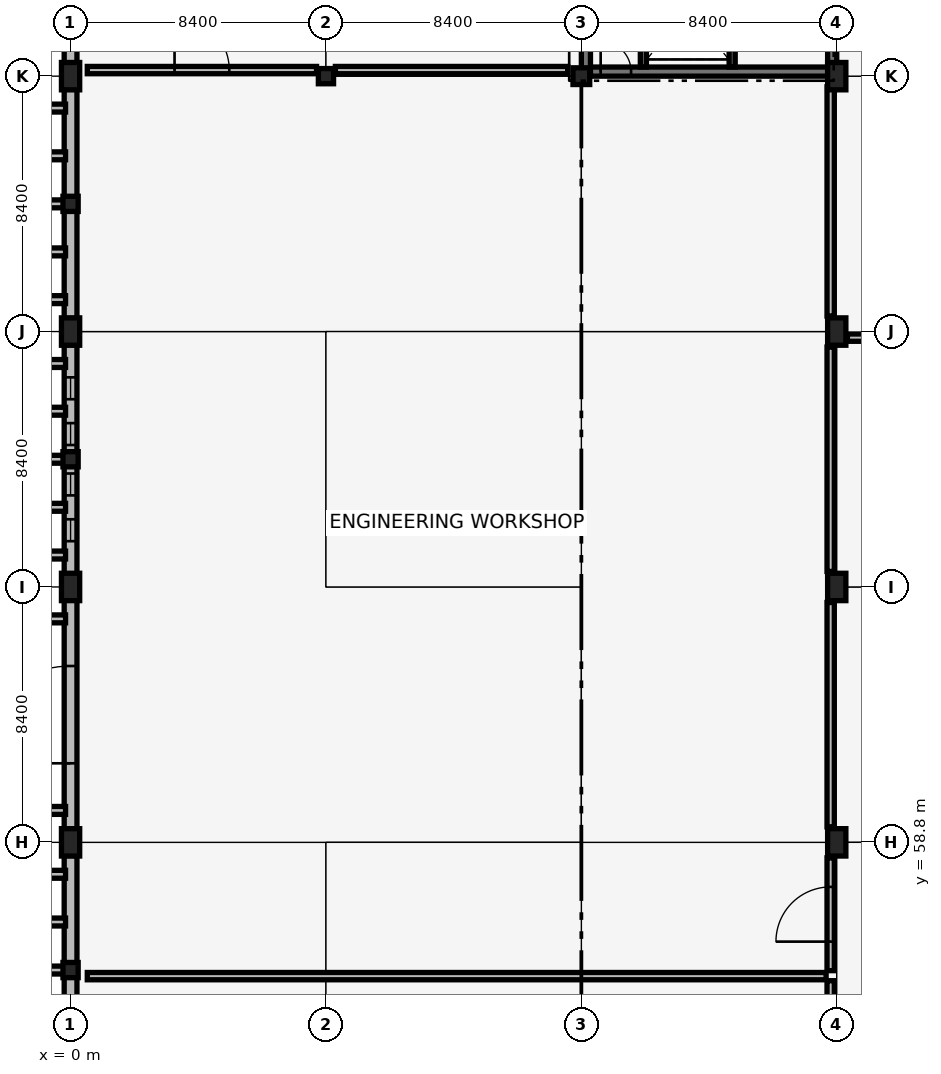
"""IFC4 building model, lengths in metres.
Left out: names, types, materials, properties, quantities, classifications, styles, units other than length and angle.
Written with IfcOpenShell. Run it as: python <this file> out.ifc"""

import sys

from ifc_helpers import new_model, si_unit, direction, frame, frame_2d, origin, origin_2d, place, context, subcontext, project, spatial, rectangle, extrude, element, fill, save


model = new_model("IFC4")
c1 = context("Model", 3, precision=1e-05, world=origin(), true_north=direction((0.0, 1.0)))
c2 = subcontext(c1, "Body", "Model", "MODEL_VIEW")
j1 = project(units=[si_unit("LENGTHUNIT", "METRE"), si_unit("PLANEANGLEUNIT", "RADIAN")], contexts=[c1])
p1 = place(None, origin())
s1 = spatial("IfcSite", under=j1, at=p1, CompositionType="ELEMENT")
p2 = place(p1, origin())
s2 = spatial("IfcBuilding", under=s1, at=p2, CompositionType="ELEMENT")
p3 = place(p2, origin())
s3 = spatial("IfcBuildingStorey", under=s2, at=p3, CompositionType="ELEMENT", Elevation=0.0)
p4 = place(p3, frame((16.95, 84.15, 0.0), z_axis=(0.0, 0.0, 1.0), x_axis=(1.0, 0.0, 0.0)))
e1 = element("IfcWall", 1, at=p4, inside=s3, PredefinedType="SHEAR", context=c2, shape_type="SweptSolid", body=[
    extrude(rectangle(XDim=8.1, YDim=0.3, at=frame_2d((4.05, 0.0))), origin(), (0.0, 0.0, 1.0), 5.14),
])
p5 = place(p4, frame((0.485, 0.0, 0.0)))
e2 = element("IfcOpeningElement", 2, at=p5, cuts=e1, PredefinedType="OPENING", context=c2, shape_type="SweptSolid", body=[
    extrude(rectangle(XDim=1.0, YDim=2.15, at=frame_2d((0.5, 1.075))), frame((0.0, 0.16, 0.0), z_axis=(0.0, -1.0, 0.0), x_axis=(1.0, 0.0, 0.0)), (0.0, 0.0, 1.0), 0.32),
])
p6 = place(p3, frame((16.95, 84.15, 0.0), z_axis=(0.0, 0.0, 1.0), x_axis=(0.0, 1.0, 0.0)))
e3 = element("IfcWall", 3, at=p6, inside=s3, PredefinedType="SHEAR", context=c2, shape_type="SweptSolid", body=[
    extrude(rectangle(XDim=8.1, YDim=0.3, at=frame_2d((4.05, 0.0))), origin(), (0.0, 0.0, 1.0), 5.14),
])
p7 = place(p3, frame((25.05, 84.15, 0.0), z_axis=(0.0, 0.0, 1.0), x_axis=(0.0, 1.0, 0.0)))
e4 = element("IfcWall", 4, at=p7, inside=s3, PredefinedType="SHEAR", context=c2, shape_type="SweptSolid", body=[
    extrude(rectangle(XDim=8.1, YDim=0.3, at=frame_2d((4.05, 0.0))), origin(), (0.0, 0.0, 1.0), 5.14),
])
p8 = place(p7, frame((1.325, 0.0, 0.0)))
e5 = element("IfcOpeningElement", 5, at=p8, cuts=e4, PredefinedType="OPENING", context=c2, shape_type="SweptSolid", body=[
    extrude(rectangle(XDim=1.45, YDim=2.15, at=frame_2d((0.725, 1.075))), frame((0.0, 0.16, 0.0), z_axis=(0.0, -1.0, 0.0), x_axis=(1.0, 0.0, 0.0)), (0.0, 0.0, 1.0), 0.32),
])
p9 = place(p3, frame((0.0, 54.6, 0.0), z_axis=(0.0, 0.0, 1.0), x_axis=(1.0, 0.0, 0.0)))
e6 = element("IfcColumn", 6, at=p9, inside=s3, PredefinedType="PILASTER", context=c2, shape_type="SweptSolid", body=[
    extrude(rectangle(XDim=0.5, YDim=0.5, at=origin_2d()), origin(), (0.0, 0.0, 1.0), 5.14),
])
for number, where, z_axis, x_axis in (
    (7, (0.0, 58.8, 0.0), (0.0, 0.0, 1.0), (1.0, 0.0, 0.0)),
    (8, (0.0, 67.2, 0.0), (0.0, 0.0, 1.0), (1.0, 0.0, 0.0)),
):
    element("IfcColumn", number, at=place(p3, frame(where, z_axis=z_axis, x_axis=x_axis)), inside=s3, PredefinedType="COLUMN", context=c2, shape_type="SweptSolid", body=[
        extrude(rectangle(XDim=0.6, YDim=0.9, at=origin_2d()), origin(), (0.0, 0.0, 1.0), 5.14),
    ])
p10 = place(p3, frame((0.0, 71.4, 0.0), z_axis=(0.0, 0.0, 1.0), x_axis=(1.0, 0.0, 0.0)))
e9 = element("IfcColumn", 9, at=p10, inside=s3, PredefinedType="PILASTER", context=c2, shape_type="SweptSolid", body=[
    extrude(rectangle(XDim=0.5, YDim=0.5, at=origin_2d()), origin(), (0.0, 0.0, 1.0), 5.14),
])
p11 = place(p3, frame((0.0, 75.6, 0.0), z_axis=(0.0, 0.0, 1.0), x_axis=(1.0, 0.0, 0.0)))
e10 = element("IfcColumn", 10, at=p11, inside=s3, PredefinedType="COLUMN", context=c2, shape_type="SweptSolid", body=[
    extrude(rectangle(XDim=0.6, YDim=0.9, at=origin_2d()), origin(), (0.0, 0.0, 1.0), 5.14),
])
p12 = place(p3, frame((0.0, 79.8, 0.0), z_axis=(0.0, 0.0, 1.0), x_axis=(1.0, 0.0, 0.0)))
e11 = element("IfcColumn", 11, at=p12, inside=s3, PredefinedType="PILASTER", context=c2, shape_type="SweptSolid", body=[
    extrude(rectangle(XDim=0.5, YDim=0.5, at=origin_2d()), origin(), (0.0, 0.0, 1.0), 5.14),
])
p13 = place(p3, frame((0.0, 84.0, 0.0), z_axis=(0.0, 0.0, 1.0), x_axis=(1.0, 0.0, 0.0)))
e12 = element("IfcColumn", 12, at=p13, inside=s3, PredefinedType="COLUMN", context=c2, shape_type="SweptSolid", body=[
    extrude(rectangle(XDim=0.6, YDim=0.9, at=origin_2d()), origin(), (0.0, 0.0, 1.0), 5.14),
])
p14 = place(p3, frame((8.4, 84.0, 0.0), z_axis=(0.0, 0.0, 1.0), x_axis=(1.0, 0.0, 0.0)))
e13 = element("IfcColumn", 13, at=p14, inside=s3, PredefinedType="COLUMN", context=c2, shape_type="SweptSolid", body=[
    extrude(rectangle(XDim=0.5, YDim=0.5, at=origin_2d()), origin(), (0.0, 0.0, 1.0), 5.14),
])
p15 = place(p3, frame((16.8, 84.0, 0.0), z_axis=(0.0, 0.0, 1.0), x_axis=(1.0, 0.0, 0.0)))
e14 = element("IfcColumn", 14, at=p15, inside=s3, PredefinedType="COLUMN", context=c2, shape_type="SweptSolid", body=[
    extrude(rectangle(XDim=0.55, YDim=0.55, at=origin_2d()), origin(), (0.0, 0.0, 1.0), 5.14),
])
for number, where, z_axis, x_axis in (
    (15, (25.2, 58.8, 0.0), (0.0, 0.0, 1.0), (1.0, 0.0, 0.0)),
    (16, (25.2, 67.2, 0.0), (0.0, 0.0, 1.0), (1.0, 0.0, 0.0)),
    (17, (25.2, 75.6, 0.0), (0.0, 0.0, 1.0), (1.0, 0.0, 0.0)),
    (18, (25.2, 84.0, 0.0), (0.0, 0.0, 1.0), (1.0, 0.0, 0.0)),
):
    element("IfcColumn", number, at=place(p3, frame(where, z_axis=z_axis, x_axis=x_axis)), inside=s3, PredefinedType="COLUMN", context=c2, shape_type="SweptSolid", body=[
        extrude(rectangle(XDim=0.6, YDim=0.9, at=origin_2d()), origin(), (0.0, 0.0, 1.0), 5.14),
    ])
p16 = place(p3, frame((0.0, 50.835, 0.0), z_axis=(0.0, 0.0, 1.0), x_axis=(0.0, 1.0, 0.0)))
e19 = element("IfcWall", 19, at=p16, inside=s3, PredefinedType="SOLIDWALL", context=c2, shape_type="SweptSolid", body=[
    extrude(rectangle(XDim=7.53, YDim=0.42, at=frame_2d((3.765, 0.0))), origin(), (0.0, 0.0, 1.0), 5.04),
])
for number, where, z_axis, x_axis in (
    (20, (-0.165, 54.6, -0.25), (0.0, 0.0, 1.0), (-1.0, 0.0, 0.0)),
    (21, (-0.165, 56.18, -0.25), (0.0, 0.0, 1.0), (-1.0, 0.0, 0.0)),
    (22, (-0.165, 57.75, -0.25), (0.0, 0.0, 1.0), (-1.0, 0.0, 0.0)),
):
    element("IfcWall", number, at=place(p3, frame(where, z_axis=z_axis, x_axis=x_axis)), inside=s3, PredefinedType="SOLIDWALL", context=c2, shape_type="SweptSolid", body=[
        extrude(rectangle(XDim=0.7, YDim=0.26, at=frame_2d((0.35, 0.0))), origin(), (0.0, 0.0, 1.0), 5.69),
    ])
p17 = place(p3, frame((0.0, 59.235, 0.0), z_axis=(0.0, 0.0, 1.0), x_axis=(0.0, 1.0, 0.0)))
e23 = element("IfcWall", 23, at=p17, inside=s3, PredefinedType="SOLIDWALL", context=c2, shape_type="SweptSolid", body=[
    extrude(rectangle(XDim=7.53, YDim=0.42, at=frame_2d((3.765, 0.0))), origin(), (0.0, 0.0, 1.0), 5.04),
])
p18 = place(p17, frame((2.165, 0.0, 0.0)))
e24 = element("IfcOpeningElement", 24, at=p18, cuts=e23, PredefinedType="OPENING", context=c2, shape_type="SweptSolid", body=[
    extrude(rectangle(XDim=3.2, YDim=3.6, at=frame_2d((1.6, 1.8))), frame((0.0, 0.22, 0.0), z_axis=(0.0, -1.0, 0.0), x_axis=(1.0, 0.0, 0.0)), (0.0, 0.0, 1.0), 0.44),
])
for number, where, z_axis, x_axis in (
    (25, (-0.165, 59.85, -0.25), (0.0, 0.0, 1.0), (-1.0, 0.0, 0.0)),
    (26, (-0.165, 66.15, -0.25), (0.0, 0.0, 1.0), (-1.0, 0.0, 0.0)),
):
    element("IfcWall", number, at=place(p3, frame(where, z_axis=z_axis, x_axis=x_axis)), inside=s3, PredefinedType="SOLIDWALL", context=c2, shape_type="SweptSolid", body=[
        extrude(rectangle(XDim=0.7, YDim=0.26, at=frame_2d((0.35, 0.0))), origin(), (0.0, 0.0, 1.0), 5.69),
    ])
p19 = place(p3, frame((0.0, 67.635, 0.0), z_axis=(0.0, 0.0, 1.0), x_axis=(0.0, 1.0, 0.0)))
e27 = element("IfcWall", 27, at=p19, inside=s3, PredefinedType="SOLIDWALL", context=c2, shape_type="SweptSolid", body=[
    extrude(rectangle(XDim=7.53, YDim=0.42, at=frame_2d((3.765, 0.0))), origin(), (0.0, 0.0, 1.0), 5.04),
])
p20 = place(p19, frame((1.071, 0.0, 0.75)))
e28 = element("IfcOpeningElement", 28, at=p20, cuts=e27, PredefinedType="OPENING", context=c2, shape_type="SweptSolid", body=[
    extrude(rectangle(XDim=0.72, YDim=2.4, at=frame_2d((0.36, 1.2))), frame((0.0, 0.22, 0.0), z_axis=(0.0, -1.0, 0.0), x_axis=(1.0, 0.0, 0.0)), (0.0, 0.0, 1.0), 0.44),
])
p21 = place(p19, frame((2.577, 0.0, 0.75)))
e29 = element("IfcOpeningElement", 29, at=p21, cuts=e27, PredefinedType="OPENING", context=c2, shape_type="SweptSolid", body=[
    extrude(rectangle(XDim=0.72, YDim=2.4, at=frame_2d((0.36, 1.2))), frame((0.0, 0.22, 0.0), z_axis=(0.0, -1.0, 0.0), x_axis=(1.0, 0.0, 0.0)), (0.0, 0.0, 1.0), 0.44),
])
p22 = place(p19, frame((4.233, 0.0, 0.75)))
e30 = element("IfcOpeningElement", 30, at=p22, cuts=e27, PredefinedType="OPENING", context=c2, shape_type="SweptSolid", body=[
    extrude(rectangle(XDim=0.72, YDim=2.4, at=frame_2d((0.36, 1.2))), frame((0.0, 0.22, 0.0), z_axis=(0.0, -1.0, 0.0), x_axis=(1.0, 0.0, 0.0)), (0.0, 0.0, 1.0), 0.44),
])
p23 = place(p19, frame((5.739, 0.0, 0.75)))
e31 = element("IfcOpeningElement", 31, at=p23, cuts=e27, PredefinedType="OPENING", context=c2, shape_type="SweptSolid", body=[
    extrude(rectangle(XDim=0.72, YDim=2.4, at=frame_2d((0.36, 1.2))), frame((0.0, 0.22, 0.0), z_axis=(0.0, -1.0, 0.0), x_axis=(1.0, 0.0, 0.0)), (0.0, 0.0, 1.0), 0.44),
])
for number, where, z_axis, x_axis in (
    (32, (-0.165, 68.25, -0.25), (0.0, 0.0, 1.0), (-1.0, 0.0, 0.0)),
    (33, (-0.165, 69.82, -0.25), (0.0, 0.0, 1.0), (-1.0, 0.0, 0.0)),
    (34, (-0.165, 71.4, -0.25), (0.0, 0.0, 1.0), (-1.0, 0.0, 0.0)),
    (35, (-0.165, 72.98, -0.25), (0.0, 0.0, 1.0), (-1.0, 0.0, 0.0)),
    (36, (-0.165, 74.55, -0.25), (0.0, 0.0, 1.0), (-1.0, 0.0, 0.0)),
):
    element("IfcWall", number, at=place(p3, frame(where, z_axis=z_axis, x_axis=x_axis)), inside=s3, PredefinedType="SOLIDWALL", context=c2, shape_type="SweptSolid", body=[
        extrude(rectangle(XDim=0.7, YDim=0.26, at=frame_2d((0.35, 0.0))), origin(), (0.0, 0.0, 1.0), 5.69),
    ])
p24 = place(p3, frame((0.0, 76.035, 0.0), z_axis=(0.0, 0.0, 1.0), x_axis=(0.0, 1.0, 0.0)))
e37 = element("IfcWall", 37, at=p24, inside=s3, PredefinedType="SOLIDWALL", context=c2, shape_type="SweptSolid", body=[
    extrude(rectangle(XDim=7.53, YDim=0.42, at=frame_2d((3.765, 0.0))), origin(), (0.0, 0.0, 1.0), 5.04),
])
for number, where, z_axis, x_axis in (
    (38, (-0.165, 76.65, -0.25), (0.0, 0.0, 1.0), (-1.0, 0.0, 0.0)),
    (39, (-0.165, 78.22, -0.25), (0.0, 0.0, 1.0), (-1.0, 0.0, 0.0)),
    (40, (-0.165, 79.8, -0.25), (0.0, 0.0, 1.0), (-1.0, 0.0, 0.0)),
    (41, (-0.165, 81.38, -0.25), (0.0, 0.0, 1.0), (-1.0, 0.0, 0.0)),
    (42, (-0.165, 82.95, -0.25), (0.0, 0.0, 1.0), (-1.0, 0.0, 0.0)),
):
    element("IfcWall", number, at=place(p3, frame(where, z_axis=z_axis, x_axis=x_axis)), inside=s3, PredefinedType="SOLIDWALL", context=c2, shape_type="SweptSolid", body=[
        extrude(rectangle(XDim=0.7, YDim=0.26, at=frame_2d((0.35, 0.0))), origin(), (0.0, 0.0, 1.0), 5.69),
    ])
p25 = place(p3, frame((0.0, 84.435, 0.0), z_axis=(0.0, 0.0, 1.0), x_axis=(0.0, 1.0, 0.0)))
e43 = element("IfcWall", 43, at=p25, inside=s3, PredefinedType="SOLIDWALL", context=c2, shape_type="SweptSolid", body=[
    extrude(rectangle(XDim=7.72, YDim=0.42, at=frame_2d((3.86, 0.0))), origin(), (0.0, 0.0, 1.0), 4.35),
])
p26 = place(p25, frame((2.16, 0.0, 0.0)))
e44 = element("IfcOpeningElement", 44, at=p26, cuts=e43, PredefinedType="OPENING", context=c2, shape_type="SweptSolid", body=[
    extrude(rectangle(XDim=3.4, YDim=3.8, at=frame_2d((1.7, 1.9))), frame((0.0, 0.22, 0.0), z_axis=(0.0, -1.0, 0.0), x_axis=(1.0, 0.0, 0.0)), (0.0, 0.0, 1.0), 0.44),
])
p27 = place(p3, frame((21.76, 84.3, 0.0), z_axis=(0.0, 0.0, 1.0), x_axis=(0.0, 1.0, 0.0)))
e45 = element("IfcWall", 45, at=p27, inside=s3, PredefinedType="SHEAR", context=c2, shape_type="SweptSolid", body=[
    extrude(rectangle(XDim=3.8, YDim=0.2, at=frame_2d((1.9, 0.0))), origin(), (0.0, 0.0, 1.0), 4.36),
])
p28 = place(p27, frame((1.2, 0.0, 0.0)))
e46 = element("IfcOpeningElement", 46, at=p28, cuts=e45, PredefinedType="OPENING", context=c2, shape_type="SweptSolid", body=[
    extrude(rectangle(XDim=1.4, YDim=2.2, at=frame_2d((0.7, 1.1))), frame((0.0, 0.11, 0.0), z_axis=(0.0, -1.0, 0.0), x_axis=(1.0, 0.0, 0.0)), (0.0, 0.0, 1.0), 0.22),
])
p29 = place(p3, frame((18.84, 84.3, 0.0), z_axis=(0.0, 0.0, 1.0), x_axis=(0.0, 1.0, 0.0)))
e47 = element("IfcWall", 47, at=p29, inside=s3, PredefinedType="SHEAR", context=c2, shape_type="SweptSolid", body=[
    extrude(rectangle(XDim=3.8, YDim=0.2, at=frame_2d((1.9, 0.0))), origin(), (0.0, 0.0, 1.0), 4.36),
])
p30 = place(p3, frame((0.55, 54.4, 0.0), z_axis=(0.0, 0.0, 1.0), x_axis=(1.0, 0.0, 0.0)))
e48 = element("IfcWall", 48, at=p30, inside=s3, PredefinedType="PARTITIONING", context=c2, shape_type="SweptSolid", body=[
    extrude(rectangle(XDim=24.3, YDim=0.24, at=frame_2d((12.15, 0.0))), origin(), (0.0, 0.0, 1.0), 5.14),
])
p31 = place(p3, frame((25.0, 50.91, 0.0), z_axis=(0.0, 0.0, 1.0), x_axis=(0.0, 1.0, 0.0)))
e49 = element("IfcWall", 49, at=p31, inside=s3, PredefinedType="PARTITIONING", context=c2, shape_type="SweptSolid", body=[
    extrude(rectangle(XDim=3.34, YDim=0.24, at=frame_2d((1.67, 0.0))), origin(), (0.0, 0.0, 1.0), 4.35),
])
p32 = place(p3, frame((25.0, 54.58, 0.0), z_axis=(0.0, 0.0, 1.0), x_axis=(0.0, 1.0, 0.0)))
e50 = element("IfcWall", 50, at=p32, inside=s3, PredefinedType="PARTITIONING", context=c2, shape_type="SweptSolid", body=[
    extrude(rectangle(XDim=3.71, YDim=0.24, at=frame_2d((1.855, 0.0))), origin(), (0.0, 0.0, 1.0), 4.35),
])
p33 = place(p32, frame((0.955, 0.0, 0.0)))
e51 = element("IfcOpeningElement", 51, at=p33, cuts=e50, PredefinedType="OPENING", context=c2, shape_type="SweptSolid", body=[
    extrude(rectangle(XDim=1.8, YDim=2.4, at=frame_2d((0.9, 1.2))), frame((0.0, 0.13, 0.0), z_axis=(0.0, -1.0, 0.0), x_axis=(1.0, 0.0, 0.0)), (0.0, 0.0, 1.0), 0.26),
])
p34 = place(p3, frame((25.0, 59.31, 0.0), z_axis=(0.0, 0.0, 1.0), x_axis=(0.0, 1.0, 0.0)))
e52 = element("IfcWall", 52, at=p34, inside=s3, PredefinedType="PARTITIONING", context=c2, shape_type="SweptSolid", body=[
    extrude(rectangle(XDim=7.38, YDim=0.24, at=frame_2d((3.69, 0.0))), origin(), (0.0, 0.0, 1.0), 4.35),
])
p35 = place(p3, frame((25.0, 67.71, 0.0), z_axis=(0.0, 0.0, 1.0), x_axis=(0.0, 1.0, 0.0)))
e53 = element("IfcWall", 53, at=p35, inside=s3, PredefinedType="PARTITIONING", context=c2, shape_type="SweptSolid", body=[
    extrude(rectangle(XDim=7.38, YDim=0.24, at=frame_2d((3.69, 0.0))), origin(), (0.0, 0.0, 1.0), 4.35),
])
p36 = place(p3, frame((25.0, 76.11, 0.0), z_axis=(0.0, 0.0, 1.0), x_axis=(0.0, 1.0, 0.0)))
e54 = element("IfcWall", 54, at=p36, inside=s3, PredefinedType="PARTITIONING", context=c2, shape_type="SweptSolid", body=[
    extrude(rectangle(XDim=7.54, YDim=0.24, at=frame_2d((3.77, 0.0))), origin(), (0.0, 0.0, 1.0), 4.35),
])
p37 = place(p3, frame((25.55, 75.4, 0.0), z_axis=(0.0, 0.0, 1.0), x_axis=(1.0, 0.0, 0.0)))
e55 = element("IfcWall", 55, at=p37, inside=s3, PredefinedType="PARTITIONING", context=c2, shape_type="SweptSolid", body=[
    extrude(rectangle(XDim=7.5, YDim=0.24, at=frame_2d((3.75, 0.0))), origin(), (0.0, 0.0, 1.0), 4.42),
])
p38 = place(p37, frame((2.85, 0.0, 0.0)))
e56 = element("IfcOpeningElement", 56, at=p38, cuts=e55, PredefinedType="OPENING", context=c2, shape_type="SweptSolid", body=[
    extrude(rectangle(XDim=1.8, YDim=2.4, at=frame_2d((0.9, 1.2))), frame((0.0, 0.13, 0.0), z_axis=(0.0, -1.0, 0.0), x_axis=(1.0, 0.0, 0.0)), (0.0, 0.0, 1.0), 0.26),
])
p39 = place(p3, frame((0.55, 84.2, 0.0), z_axis=(0.0, 0.0, 1.0), x_axis=(1.0, 0.0, 0.0)))
e57 = element("IfcWall", 57, at=p39, inside=s3, PredefinedType="PARTITIONING", context=c2, shape_type="SweptSolid", body=[
    extrude(rectangle(XDim=7.54, YDim=0.24, at=frame_2d((3.77, 0.0))), origin(), (0.0, 0.0, 1.0), 4.36),
])
p40 = place(p39, frame((2.87, 0.0, 0.0)))
e58 = element("IfcOpeningElement", 58, at=p40, cuts=e57, PredefinedType="OPENING", context=c2, shape_type="SweptSolid", body=[
    extrude(rectangle(XDim=1.8, YDim=2.4, at=frame_2d((0.9, 1.2))), frame((0.0, 0.13, 0.0), z_axis=(0.0, -1.0, 0.0), x_axis=(1.0, 0.0, 0.0)), (0.0, 0.0, 1.0), 0.26),
])
p41 = place(p3, frame((8.71, 84.2, 0.0), z_axis=(0.0, 0.0, 1.0), x_axis=(1.0, 0.0, 0.0)))
e59 = element("IfcWall", 59, at=p41, inside=s3, PredefinedType="PARTITIONING", context=c2, shape_type="SweptSolid", body=[
    extrude(rectangle(XDim=7.64, YDim=0.24, at=frame_2d((3.82, 0.0))), origin(), (0.0, 0.0, 1.0), 4.36),
])
p42 = place(p18, origin())
e60 = element("IfcDoor", 60, at=p42, inside=s3, OperationType="DOUBLE_DOOR_SINGLE_SWING", PredefinedType="GATE", context=c2, shape_type="SweptSolid", body=[
    extrude(rectangle(XDim=3.2, YDim=3.6, at=frame_2d((1.6, 1.8))), frame((0.0, 0.025, 0.0), z_axis=(0.0, -1.0, 0.0), x_axis=(1.0, 0.0, 0.0)), (0.0, 0.0, 1.0), 0.05),
])
fill(e24, e60)
p43 = place(p20, origin())
e61 = element("IfcWindow", 61, at=p43, inside=s3, PartitioningType="DOUBLE_PANEL_VERTICAL", PredefinedType="WINDOW", context=c2, shape_type="SweptSolid", body=[
    extrude(rectangle(XDim=0.72, YDim=2.4, at=frame_2d((0.36, 1.2))), frame((0.0, 0.03, 0.0), z_axis=(0.0, -1.0, 0.0), x_axis=(1.0, 0.0, 0.0)), (0.0, 0.0, 1.0), 0.06),
])
fill(e28, e61)
p44 = place(p21, origin())
e62 = element("IfcWindow", 62, at=p44, inside=s3, PartitioningType="DOUBLE_PANEL_VERTICAL", PredefinedType="WINDOW", context=c2, shape_type="SweptSolid", body=[
    extrude(rectangle(XDim=0.72, YDim=2.4, at=frame_2d((0.36, 1.2))), frame((0.0, 0.03, 0.0), z_axis=(0.0, -1.0, 0.0), x_axis=(1.0, 0.0, 0.0)), (0.0, 0.0, 1.0), 0.06),
])
fill(e29, e62)
p45 = place(p22, origin())
e63 = element("IfcWindow", 63, at=p45, inside=s3, PartitioningType="DOUBLE_PANEL_VERTICAL", PredefinedType="WINDOW", context=c2, shape_type="SweptSolid", body=[
    extrude(rectangle(XDim=0.72, YDim=2.4, at=frame_2d((0.36, 1.2))), frame((0.0, 0.03, 0.0), z_axis=(0.0, -1.0, 0.0), x_axis=(1.0, 0.0, 0.0)), (0.0, 0.0, 1.0), 0.06),
])
fill(e30, e63)
p46 = place(p23, origin())
e64 = element("IfcWindow", 64, at=p46, inside=s3, PartitioningType="DOUBLE_PANEL_VERTICAL", PredefinedType="WINDOW", context=c2, shape_type="SweptSolid", body=[
    extrude(rectangle(XDim=0.72, YDim=2.4, at=frame_2d((0.36, 1.2))), frame((0.0, 0.03, 0.0), z_axis=(0.0, -1.0, 0.0), x_axis=(1.0, 0.0, 0.0)), (0.0, 0.0, 1.0), 0.06),
])
fill(e31, e64)
p47 = place(p5, origin())
e65 = element("IfcDoor", 65, at=p47, inside=s3, OperationType="SINGLE_SWING_LEFT", PredefinedType="DOOR", context=c2, shape_type="SweptSolid", body=[
    extrude(rectangle(XDim=1.0, YDim=2.15, at=frame_2d((0.5, 1.075))), frame((0.0, 0.025, 0.0), z_axis=(0.0, -1.0, 0.0), x_axis=(1.0, 0.0, 0.0)), (0.0, 0.0, 1.0), 0.05),
])
fill(e2, e65)
p48 = place(p33, origin())
e66 = element("IfcDoor", 66, at=p48, inside=s3, OperationType="DOUBLE_DOOR_SINGLE_SWING", PredefinedType="DOOR", context=c2, shape_type="SweptSolid", body=[
    extrude(rectangle(XDim=1.8, YDim=2.4, at=frame_2d((0.9, 1.2))), frame((0.0, 0.025, 0.0), z_axis=(0.0, -1.0, 0.0), x_axis=(1.0, 0.0, 0.0)), (0.0, 0.0, 1.0), 0.05),
])
fill(e51, e66)
p49 = place(p40, origin())
e67 = element("IfcDoor", 67, at=p49, inside=s3, OperationType="DOUBLE_DOOR_SINGLE_SWING", PredefinedType="DOOR", context=c2, shape_type="SweptSolid", body=[
    extrude(rectangle(XDim=1.8, YDim=2.4, at=frame_2d((0.9, 1.2))), frame((0.0, 0.025, 0.0), z_axis=(0.0, -1.0, 0.0), x_axis=(1.0, 0.0, 0.0)), (0.0, 0.0, 1.0), 0.05),
])
fill(e58, e67)
save(model, sys.argv[1])
